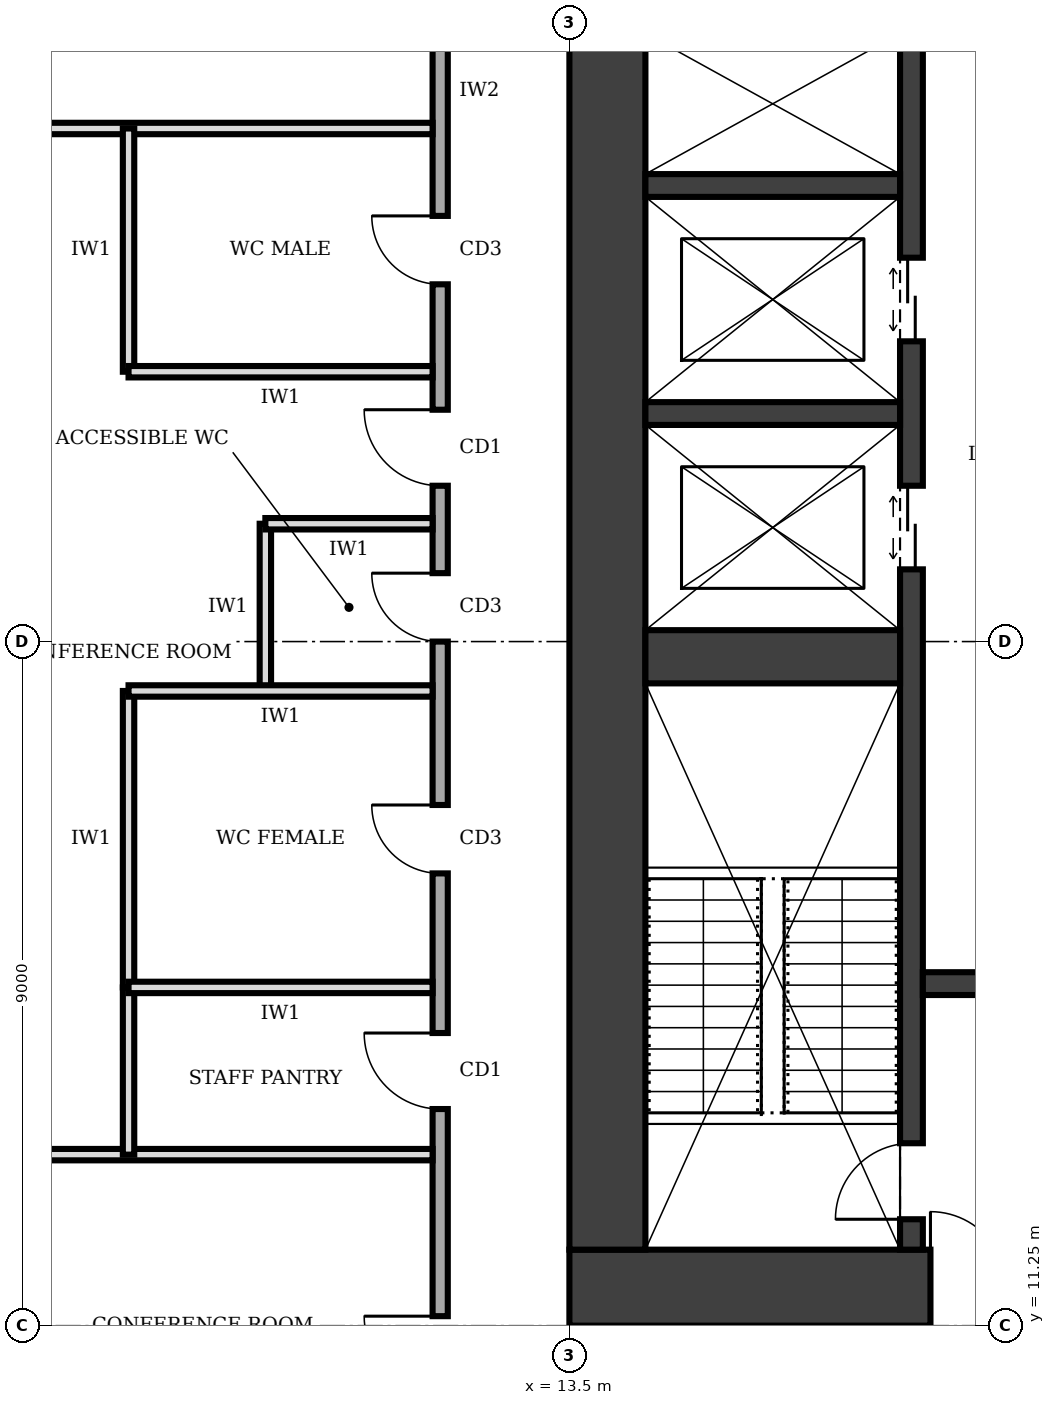
"""IFC4 building model, lengths in metres.
Left out: names, types, materials, properties, quantities, classifications, styles, units other than length and angle.
Written with IfcOpenShell. Run it as: python <this file> out.ifc"""

import sys

from ifc_helpers import new_model, si_unit, direction, frame, frame_2d, origin, place, context, subcontext, project, spatial, rectangle, extrude, element, fill, save


model = new_model("IFC4")
c1 = context("Model", 3, precision=1e-05, world=origin(), true_north=direction((0.0, 1.0)))
c2 = subcontext(c1, "Body", "Model", "MODEL_VIEW")
j1 = project(units=[si_unit("LENGTHUNIT", "METRE"), si_unit("PLANEANGLEUNIT", "RADIAN")], contexts=[c1])
p1 = place(None, origin())
s1 = spatial("IfcSite", under=j1, at=p1, CompositionType="ELEMENT")
p2 = place(p1, origin())
s2 = spatial("IfcBuilding", under=s1, at=p2, CompositionType="ELEMENT")
p3 = place(p2, frame((0.0, 0.0, 97.0)))
s3 = spatial("IfcBuildingStorey", under=s2, at=p3, CompositionType="ELEMENT", Elevation=97.0)
p4 = place(p3, frame((13.5, 11.75, 0.0), z_axis=(0.0, 0.0, 1.0), x_axis=(1.0, 0.0, 0.0)))
e1 = element("IfcWall", 1, at=p4, inside=s3, PredefinedType="SHEAR", context=c2, shape_type="SweptSolid", body=[
    extrude(rectangle(XDim=13.5, YDim=1.0, at=frame_2d((6.75, 0.0))), origin(), (0.0, 0.0, 1.0), 4.0),
])
p5 = place(p4, frame((4.75, 0.0, 0.0)))
e2 = element("IfcOpeningElement", 2, at=p5, cuts=e1, PredefinedType="OPENING", context=c2, shape_type="SweptSolid", body=[
    extrude(rectangle(XDim=1.0, YDim=2.1, at=frame_2d((0.5, 1.05))), frame((0.0, 0.51, 0.0), z_axis=(0.0, -1.0, 0.0), x_axis=(1.0, 0.0, 0.0)), (0.0, 0.0, 1.0), 1.02),
])
p6 = place(p3, frame((14.0, 28.25, 0.0), z_axis=(0.0, 0.0, 1.0), x_axis=(0.0, -1.0, 0.0)))
e3 = element("IfcWall", 3, at=p6, inside=s3, PredefinedType="SHEAR", context=c2, shape_type="SweptSolid", body=[
    extrude(rectangle(XDim=16.0, YDim=1.0, at=frame_2d((8.0, 0.0))), origin(), (0.0, 0.0, 1.0), 4.0),
])
p7 = place(p3, frame((18.0, 12.25, 0.0), z_axis=(0.0, 0.0, 1.0), x_axis=(0.0, 1.0, 0.0)))
e4 = element("IfcWall", 4, at=p7, inside=s3, PredefinedType="SHEAR", context=c2, shape_type="SweptSolid", body=[
    extrude(rectangle(XDim=16.0, YDim=0.3, at=frame_2d((8.0, 0.0))), origin(), (0.0, 0.0, 1.0), 4.0),
])
p8 = place(p7, frame((0.4, 0.0, 0.0)))
e5 = element("IfcOpeningElement", 5, at=p8, cuts=e4, PredefinedType="OPENING", context=c2, shape_type="SweptSolid", body=[
    extrude(rectangle(XDim=1.0, YDim=2.1, at=frame_2d((0.5, 1.05))), frame((0.0, 0.16, 0.0), z_axis=(0.0, -1.0, 0.0), x_axis=(1.0, 0.0, 0.0)), (0.0, 0.0, 1.0), 0.32),
])
p9 = place(p7, frame((8.95, 0.0, 0.0)))
e6 = element("IfcOpeningElement", 6, at=p9, cuts=e4, PredefinedType="OPENING", context=c2, shape_type="SweptSolid", body=[
    extrude(rectangle(XDim=1.1, YDim=2.1, at=frame_2d((0.55, 1.05))), frame((0.0, 0.16, 0.0), z_axis=(0.0, -1.0, 0.0), x_axis=(1.0, 0.0, 0.0)), (0.0, 0.0, 1.0), 0.32),
])
p10 = place(p7, frame((11.95, 0.0, 0.0)))
e7 = element("IfcOpeningElement", 7, at=p10, cuts=e4, PredefinedType="OPENING", context=c2, shape_type="SweptSolid", body=[
    extrude(rectangle(XDim=1.1, YDim=2.1, at=frame_2d((0.55, 1.05))), frame((0.0, 0.16, 0.0), z_axis=(0.0, -1.0, 0.0), x_axis=(1.0, 0.0, 0.0)), (0.0, 0.0, 1.0), 0.32),
])
p11 = place(p3, frame((14.5, 20.05, 0.0), z_axis=(0.0, 0.0, 1.0), x_axis=(1.0, 0.0, 0.0)))
e8 = element("IfcWall", 8, at=p11, inside=s3, PredefinedType="SHEAR", context=c2, shape_type="SweptSolid", body=[
    extrude(rectangle(XDim=3.35, YDim=0.7, at=frame_2d((1.675, 0.0))), origin(), (0.0, 0.0, 1.0), 4.0),
])
p12 = place(p3, frame((18.15, 15.75, 0.0), z_axis=(0.0, 0.0, 1.0), x_axis=(1.0, 0.0, 0.0)))
e9 = element("IfcWall", 9, at=p12, inside=s3, PredefinedType="SHEAR", context=c2, shape_type="SweptSolid", body=[
    extrude(rectangle(XDim=4.2, YDim=0.3, at=frame_2d((2.1, 0.0))), origin(), (0.0, 0.0, 1.0), 4.0),
])
p13 = place(p12, frame((1.6, 0.0, 0.0)))
e10 = element("IfcOpeningElement", 10, at=p13, cuts=e9, PredefinedType="OPENING", context=c2, shape_type="SweptSolid", body=[
    extrude(rectangle(XDim=1.0, YDim=2.1, at=frame_2d((0.5, 1.05))), frame((0.0, 0.16, 0.0), z_axis=(0.0, -1.0, 0.0), x_axis=(1.0, 0.0, 0.0)), (0.0, 0.0, 1.0), 0.32),
])
for number, where, z_axis, x_axis in (
    (11, (14.5, 23.25, 0.0), (0.0, 0.0, 1.0), (1.0, 0.0, 0.0)),
    (12, (14.5, 26.25, 0.0), (0.0, 0.0, 1.0), (1.0, 0.0, 0.0)),
):
    element("IfcWall", number, at=place(p3, frame(where, z_axis=z_axis, x_axis=x_axis)), inside=s3, PredefinedType="SHEAR", context=c2, shape_type="SweptSolid", body=[
        extrude(rectangle(XDim=3.35, YDim=0.3, at=frame_2d((1.675, 0.0))), origin(), (0.0, 0.0, 1.0), 4.0),
    ])
p14 = place(p3, frame((11.8, 32.05, 0.0), z_axis=(0.0, 0.0, 1.0), x_axis=(0.0, -1.0, 0.0)))
e13 = element("IfcWall", 13, at=p14, inside=s3, PredefinedType="SOLIDWALL", context=c2, shape_type="SweptSolid", body=[
    extrude(rectangle(XDim=23.8, YDim=0.2, at=frame_2d((11.9, 0.0))), origin(), (0.0, 0.0, 1.0), 3.75),
])
p15 = place(p14, frame((20.675, 0.0, 0.0)))
e14 = element("IfcOpeningElement", 14, at=p15, cuts=e13, PredefinedType="OPENING", context=c2, shape_type="SweptSolid", body=[
    extrude(rectangle(XDim=1.0, YDim=2.1, at=frame_2d((0.5, 1.05))), frame((0.0, 0.11, 0.0), z_axis=(0.0, -1.0, 0.0), x_axis=(1.0, 0.0, 0.0)), (0.0, 0.0, 1.0), 0.22),
])
p16 = place(p14, frame((16.95, 0.0, 0.0)))
e15 = element("IfcOpeningElement", 15, at=p16, cuts=e13, PredefinedType="OPENING", context=c2, shape_type="SweptSolid", body=[
    extrude(rectangle(XDim=1.0, YDim=2.1, at=frame_2d((0.5, 1.05))), frame((0.0, 0.11, 0.0), z_axis=(0.0, -1.0, 0.0), x_axis=(1.0, 0.0, 0.0)), (0.0, 0.0, 1.0), 0.22),
])
p17 = place(p14, frame((13.95, 0.0, 0.0)))
e16 = element("IfcOpeningElement", 16, at=p17, cuts=e13, PredefinedType="OPENING", context=c2, shape_type="SweptSolid", body=[
    extrude(rectangle(XDim=0.9, YDim=2.1, at=frame_2d((0.45, 1.05))), frame((0.0, 0.11, 0.0), z_axis=(0.0, -1.0, 0.0), x_axis=(1.0, 0.0, 0.0)), (0.0, 0.0, 1.0), 0.22),
])
p18 = place(p14, frame((10.9, 0.0, 0.0)))
e17 = element("IfcOpeningElement", 17, at=p18, cuts=e13, PredefinedType="OPENING", context=c2, shape_type="SweptSolid", body=[
    extrude(rectangle(XDim=0.9, YDim=2.1, at=frame_2d((0.45, 1.05))), frame((0.0, 0.11, 0.0), z_axis=(0.0, -1.0, 0.0), x_axis=(1.0, 0.0, 0.0)), (0.0, 0.0, 1.0), 0.22),
])
p19 = place(p14, frame((6.2, 0.0, 0.0)))
e18 = element("IfcOpeningElement", 18, at=p19, cuts=e13, PredefinedType="OPENING", context=c2, shape_type="SweptSolid", body=[
    extrude(rectangle(XDim=0.9, YDim=2.1, at=frame_2d((0.45, 1.05))), frame((0.0, 0.11, 0.0), z_axis=(0.0, -1.0, 0.0), x_axis=(1.0, 0.0, 0.0)), (0.0, 0.0, 1.0), 0.22),
])
p20 = place(p14, frame((8.75, 0.0, 0.0)))
e19 = element("IfcOpeningElement", 19, at=p20, cuts=e13, PredefinedType="OPENING", context=c2, shape_type="SweptSolid", body=[
    extrude(rectangle(XDim=1.0, YDim=2.1, at=frame_2d((0.5, 1.05))), frame((0.0, 0.11, 0.0), z_axis=(0.0, -1.0, 0.0), x_axis=(1.0, 0.0, 0.0)), (0.0, 0.0, 1.0), 0.22),
])
p21 = place(p14, frame((1.925, 0.0, 0.0)))
e20 = element("IfcOpeningElement", 20, at=p21, cuts=e13, PredefinedType="OPENING", context=c2, shape_type="SweptSolid", body=[
    extrude(rectangle(XDim=1.0, YDim=2.1, at=frame_2d((0.5, 1.05))), frame((0.0, 0.11, 0.0), z_axis=(0.0, -1.0, 0.0), x_axis=(1.0, 0.0, 0.0)), (0.0, 0.0, 1.0), 0.22),
])
for number, where, z_axis, x_axis in (
    (21, (0.3, 13.5, 0.0), (0.0, 0.0, 1.0), (1.0, 0.0, 0.0)),
    (22, (0.3, 27.0, 0.0), (0.0, 0.0, 1.0), (1.0, 0.0, 0.0)),
):
    element("IfcWall", number, at=place(p3, frame(where, z_axis=z_axis, x_axis=x_axis)), inside=s3, PredefinedType="PARTITIONING", context=c2, shape_type="SweptSolid", body=[
        extrude(rectangle(XDim=11.4, YDim=0.15, at=frame_2d((5.7, 0.0))), origin(), (0.0, 0.0, 1.0), 3.75),
    ])
p22 = place(p3, frame((11.7, 15.7, 0.0), z_axis=(0.0, 0.0, 1.0), x_axis=(-1.0, 0.0, 0.0)))
e23 = element("IfcWall", 23, at=p22, inside=s3, PredefinedType="PARTITIONING", context=c2, shape_type="SweptSolid", body=[
    extrude(rectangle(XDim=4.0, YDim=0.15, at=frame_2d((2.0, 0.0))), origin(), (0.0, 0.0, 1.0), 3.75),
])
p23 = place(p3, frame((11.7, 19.6, 0.0), z_axis=(0.0, 0.0, 1.0), x_axis=(-1.0, 0.0, 0.0)))
e24 = element("IfcWall", 24, at=p23, inside=s3, PredefinedType="PARTITIONING", context=c2, shape_type="SweptSolid", body=[
    extrude(rectangle(XDim=4.0, YDim=0.15, at=frame_2d((2.0, 0.0))), origin(), (0.0, 0.0, 1.0), 2.85),
])
p24 = place(p3, frame((11.7, 21.8, 0.0), z_axis=(0.0, 0.0, 1.0), x_axis=(-1.0, 0.0, 0.0)))
e25 = element("IfcWall", 25, at=p24, inside=s3, PredefinedType="PARTITIONING", context=c2, shape_type="SweptSolid", body=[
    extrude(rectangle(XDim=2.2, YDim=0.15, at=frame_2d((1.1, 0.0))), origin(), (0.0, 0.0, 1.0), 3.75),
])
p25 = place(p3, frame((11.7, 23.8, 0.0), z_axis=(0.0, 0.0, 1.0), x_axis=(-1.0, 0.0, 0.0)))
e26 = element("IfcWall", 26, at=p25, inside=s3, PredefinedType="PARTITIONING", context=c2, shape_type="SweptSolid", body=[
    extrude(rectangle(XDim=4.0, YDim=0.15, at=frame_2d((2.0, 0.0))), origin(), (0.0, 0.0, 1.0), 3.75),
])
p26 = place(p3, frame((7.7, 13.5, 0.0), z_axis=(0.0, 0.0, 1.0), x_axis=(0.0, 1.0, 0.0)))
e27 = element("IfcWall", 27, at=p26, inside=s3, PredefinedType="PARTITIONING", context=c2, shape_type="SweptSolid", body=[
    extrude(rectangle(XDim=2.2, YDim=0.15, at=frame_2d((1.1, 0.0))), origin(), (0.0, 0.0, 1.0), 3.75),
])
p27 = place(p3, frame((7.7, 15.7, 0.0), z_axis=(0.0, 0.0, 1.0), x_axis=(0.0, 1.0, 0.0)))
e28 = element("IfcWall", 28, at=p27, inside=s3, PredefinedType="PARTITIONING", context=c2, shape_type="SweptSolid", body=[
    extrude(rectangle(XDim=3.9, YDim=0.15, at=frame_2d((1.95, 0.0))), origin(), (0.0, 0.0, 1.0), 3.75),
])
p28 = place(p3, frame((9.5, 19.6, 0.0), z_axis=(0.0, 0.0, 1.0), x_axis=(0.0, 1.0, 0.0)))
e29 = element("IfcWall", 29, at=p28, inside=s3, PredefinedType="PARTITIONING", context=c2, shape_type="SweptSolid", body=[
    extrude(rectangle(XDim=2.2, YDim=0.15, at=frame_2d((1.1, 0.0))), origin(), (0.0, 0.0, 1.0), 3.75),
])
p29 = place(p3, frame((7.7, 23.8, 0.0), z_axis=(0.0, 0.0, 1.0), x_axis=(0.0, 1.0, 0.0)))
e30 = element("IfcWall", 30, at=p29, inside=s3, PredefinedType="PARTITIONING", context=c2, shape_type="SweptSolid", body=[
    extrude(rectangle(XDim=3.2, YDim=0.15, at=frame_2d((1.6, 0.0))), origin(), (0.0, 0.0, 1.0), 3.75),
])
p30 = place(p5, origin())
e31 = element("IfcDoor", 31, at=p30, inside=s3, OperationType="SINGLE_SWING_LEFT", PredefinedType="DOOR", context=c2, shape_type="SweptSolid", body=[
    extrude(rectangle(XDim=1.0, YDim=2.1, at=frame_2d((0.5, 1.05))), frame((0.0, 0.025, 0.0), z_axis=(0.0, -1.0, 0.0), x_axis=(1.0, 0.0, 0.0)), (0.0, 0.0, 1.0), 0.05),
])
fill(e2, e31)
p31 = place(p8, origin())
e32 = element("IfcDoor", 32, at=p31, inside=s3, OperationType="SINGLE_SWING_LEFT", PredefinedType="DOOR", context=c2, shape_type="SweptSolid", body=[
    extrude(rectangle(XDim=1.0, YDim=2.1, at=frame_2d((0.5, 1.05))), frame((0.0, 0.025, 0.0), z_axis=(0.0, -1.0, 0.0), x_axis=(1.0, 0.0, 0.0)), (0.0, 0.0, 1.0), 0.05),
])
fill(e5, e32)
p32 = place(p9, origin())
e33 = element("IfcDoor", 33, at=p32, inside=s3, OperationType="DOUBLE_DOOR_SLIDING", PredefinedType="DOOR", context=c2, shape_type="SweptSolid", body=[
    extrude(rectangle(XDim=1.1, YDim=2.1, at=frame_2d((0.55, 1.05))), frame((0.0, 0.025, 0.0), z_axis=(0.0, -1.0, 0.0), x_axis=(1.0, 0.0, 0.0)), (0.0, 0.0, 1.0), 0.05),
])
fill(e6, e33)
p33 = place(p10, origin())
e34 = element("IfcDoor", 34, at=p33, inside=s3, OperationType="DOUBLE_DOOR_SLIDING", PredefinedType="DOOR", context=c2, shape_type="SweptSolid", body=[
    extrude(rectangle(XDim=1.1, YDim=2.1, at=frame_2d((0.55, 1.05))), frame((0.0, 0.025, 0.0), z_axis=(0.0, -1.0, 0.0), x_axis=(1.0, 0.0, 0.0)), (0.0, 0.0, 1.0), 0.05),
])
fill(e7, e34)
p34 = place(p15, frame((1.0, 0.0, 0.0), z_axis=(0.0, 0.0, 1.0), x_axis=(-1.0, 0.0, 0.0)))
e35 = element("IfcDoor", 35, at=p34, inside=s3, OperationType="SINGLE_SWING_RIGHT", PredefinedType="DOOR", context=c2, shape_type="SweptSolid", body=[
    extrude(rectangle(XDim=1.0, YDim=2.1, at=frame_2d((0.5, 1.05))), frame((0.0, 0.025, 0.0), z_axis=(0.0, -1.0, 0.0), x_axis=(1.0, 0.0, 0.0)), (0.0, 0.0, 1.0), 0.05),
])
fill(e14, e35)
p35 = place(p16, frame((1.0, 0.0, 0.0), z_axis=(0.0, 0.0, 1.0), x_axis=(-1.0, 0.0, 0.0)))
e36 = element("IfcDoor", 36, at=p35, inside=s3, OperationType="SINGLE_SWING_RIGHT", PredefinedType="DOOR", context=c2, shape_type="SweptSolid", body=[
    extrude(rectangle(XDim=1.0, YDim=2.1, at=frame_2d((0.5, 1.05))), frame((0.0, 0.025, 0.0), z_axis=(0.0, -1.0, 0.0), x_axis=(1.0, 0.0, 0.0)), (0.0, 0.0, 1.0), 0.05),
])
fill(e15, e36)
p36 = place(p17, frame((0.9, 0.0, 0.0), z_axis=(0.0, 0.0, 1.0), x_axis=(-1.0, 0.0, 0.0)))
e37 = element("IfcDoor", 37, at=p36, inside=s3, OperationType="SINGLE_SWING_RIGHT", PredefinedType="DOOR", context=c2, shape_type="SweptSolid", body=[
    extrude(rectangle(XDim=0.9, YDim=2.1, at=frame_2d((0.45, 1.05))), frame((0.0, 0.025, 0.0), z_axis=(0.0, -1.0, 0.0), x_axis=(1.0, 0.0, 0.0)), (0.0, 0.0, 1.0), 0.05),
])
fill(e16, e37)
p37 = place(p18, frame((0.9, 0.0, 0.0), z_axis=(0.0, 0.0, 1.0), x_axis=(-1.0, 0.0, 0.0)))
e38 = element("IfcDoor", 38, at=p37, inside=s3, OperationType="SINGLE_SWING_RIGHT", PredefinedType="DOOR", context=c2, shape_type="SweptSolid", body=[
    extrude(rectangle(XDim=0.9, YDim=2.1, at=frame_2d((0.45, 1.05))), frame((0.0, 0.025, 0.0), z_axis=(0.0, -1.0, 0.0), x_axis=(1.0, 0.0, 0.0)), (0.0, 0.0, 1.0), 0.05),
])
fill(e17, e38)
p38 = place(p19, frame((0.9, 0.0, 0.0), z_axis=(0.0, 0.0, 1.0), x_axis=(-1.0, 0.0, 0.0)))
e39 = element("IfcDoor", 39, at=p38, inside=s3, OperationType="SINGLE_SWING_RIGHT", PredefinedType="DOOR", context=c2, shape_type="SweptSolid", body=[
    extrude(rectangle(XDim=0.9, YDim=2.1, at=frame_2d((0.45, 1.05))), frame((0.0, 0.025, 0.0), z_axis=(0.0, -1.0, 0.0), x_axis=(1.0, 0.0, 0.0)), (0.0, 0.0, 1.0), 0.05),
])
fill(e18, e39)
p39 = place(p20, frame((1.0, 0.0, 0.0), z_axis=(0.0, 0.0, 1.0), x_axis=(-1.0, 0.0, 0.0)))
e40 = element("IfcDoor", 40, at=p39, inside=s3, OperationType="SINGLE_SWING_RIGHT", PredefinedType="DOOR", context=c2, shape_type="SweptSolid", body=[
    extrude(rectangle(XDim=1.0, YDim=2.1, at=frame_2d((0.5, 1.05))), frame((0.0, 0.025, 0.0), z_axis=(0.0, -1.0, 0.0), x_axis=(1.0, 0.0, 0.0)), (0.0, 0.0, 1.0), 0.05),
])
fill(e19, e40)
save(model, sys.argv[1])
